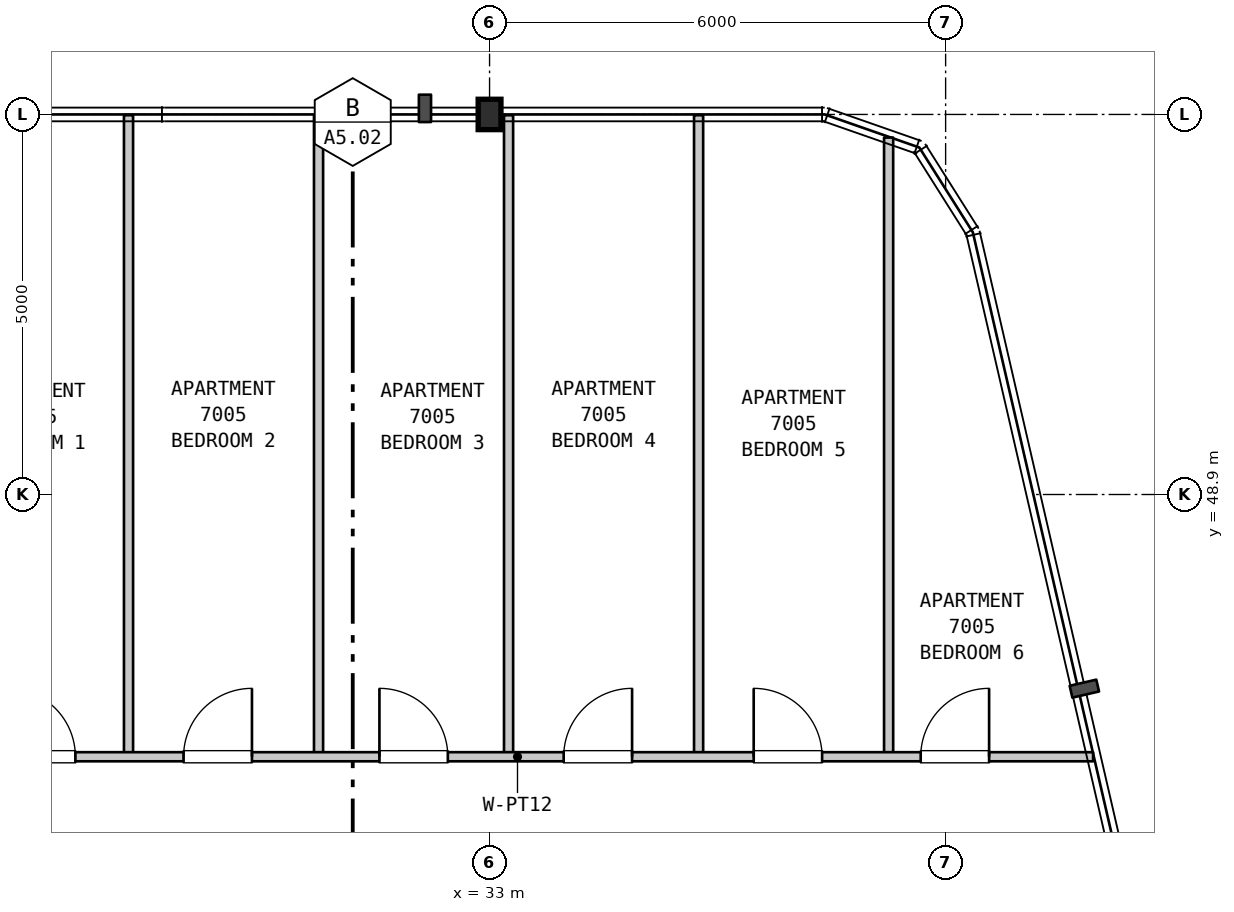
"""IFC4 building model, lengths in metres.
Left out: names, types, materials, properties, quantities, classifications, styles, units other than length and angle.
Written with IfcOpenShell. Run it as: python <this file> out.ifc"""

import sys

from ifc_helpers import new_model, si_unit, direction, frame, frame_2d, origin, origin_2d, place, context, subcontext, project, spatial, rectangle, i_section, extrude, element, fill, save


model = new_model("IFC4")
c1 = context("Model", 3, precision=1e-05, world=origin(), true_north=direction((0.0, 1.0)))
c2 = subcontext(c1, "Body", "Model", "MODEL_VIEW")
j1 = project(units=[si_unit("LENGTHUNIT", "METRE"), si_unit("PLANEANGLEUNIT", "RADIAN")], contexts=[c1])
p1 = place(None, origin())
s1 = spatial("IfcSite", under=j1, at=p1, CompositionType="ELEMENT")
p2 = place(p1, origin())
s2 = spatial("IfcBuilding", under=s1, at=p2, CompositionType="ELEMENT")
p3 = place(p2, frame((0.0, 0.0, 280.6)))
s3 = spatial("IfcBuildingStorey", under=s2, at=p3, CompositionType="ELEMENT", Elevation=280.6)
p4 = place(p3, frame((33.0, 53.9, 0.0), z_axis=(0.0, 0.0, 1.0), x_axis=(1.0, 0.0, 0.0)))
e1 = element("IfcColumn", 1, at=p4, inside=s3, PredefinedType="COLUMN", context=c2, shape_type="SweptSolid", body=[
    extrude(i_section(OverallWidth=0.3, OverallDepth=0.4, WebThickness=0.013, FlangeThickness=0.024, FilletRadius=0.027, at=origin_2d()), origin(), (0.0, 0.0, 1.0), 3.7),
])
for number, where, z_axis, x_axis in (
    (2, (28.25, 45.45, 0.0), (0.0, 0.0, 1.0), (0.0, 1.0, 0.0)),
    (3, (30.75, 45.45, 0.0), (0.0, 0.0, 1.0), (0.0, 1.0, 0.0)),
    (4, (33.25, 45.45, 0.0), (0.0, 0.0, 1.0), (0.0, 1.0, 0.0)),
    (5, (35.75, 45.45, 0.0), (0.0, 0.0, 1.0), (0.0, 1.0, 0.0)),
):
    element("IfcWall", number, at=place(p3, frame(where, z_axis=z_axis, x_axis=x_axis)), inside=s3, PredefinedType="PARTITIONING", context=c2, shape_type="SweptSolid", body=[
        extrude(rectangle(XDim=8.44, YDim=0.12, at=frame_2d((4.22, 0.0))), origin(), (0.0, 0.0, 1.0), 3.39),
    ])
p5 = place(p3, frame((38.25, 45.45, 0.0), z_axis=(0.0, 0.0, 1.0), x_axis=(0.0, 1.0, 0.0)))
e6 = element("IfcWall", 6, at=p5, inside=s3, PredefinedType="PARTITIONING", context=c2, shape_type="SweptSolid", body=[
    extrude(rectangle(XDim=8.146, YDim=0.12, at=frame_2d((4.073, 0.0))), origin(), (0.0, 0.0, 1.0), 3.39),
])
p6 = place(p3, frame((25.795, 45.45, 0.0), z_axis=(0.0, 0.0, 1.0), x_axis=(1.0, 0.0, 0.0)))
e7 = element("IfcWall", 7, at=p6, inside=s3, PredefinedType="PARTITIONING", context=c2, shape_type="SweptSolid", body=[
    extrude(rectangle(XDim=15.145, YDim=0.12, at=frame_2d((7.573, 0.0))), origin(), (0.0, 0.0, 1.0), 3.39),
])
p7 = place(p6, frame((0.856, 0.0, 0.0)))
e8 = element("IfcOpeningElement", 8, at=p7, cuts=e7, PredefinedType="OPENING", context=c2, shape_type="SweptSolid", body=[
    extrude(rectangle(XDim=0.9, YDim=2.15, at=frame_2d((0.45, 1.075))), frame((0.0, 0.07, 0.0), z_axis=(0.0, -1.0, 0.0), x_axis=(1.0, 0.0, 0.0)), (0.0, 0.0, 1.0), 0.14),
])
p8 = place(p6, frame((3.179, 0.0, 0.0)))
e9 = element("IfcOpeningElement", 9, at=p8, cuts=e7, PredefinedType="OPENING", context=c2, shape_type="SweptSolid", body=[
    extrude(rectangle(XDim=0.9, YDim=2.15, at=frame_2d((0.45, 1.075))), frame((0.0, 0.07, 0.0), z_axis=(0.0, -1.0, 0.0), x_axis=(1.0, 0.0, 0.0)), (0.0, 0.0, 1.0), 0.14),
])
p9 = place(p6, frame((5.756, 0.0, 0.0)))
e10 = element("IfcOpeningElement", 10, at=p9, cuts=e7, PredefinedType="OPENING", context=c2, shape_type="SweptSolid", body=[
    extrude(rectangle(XDim=0.9, YDim=2.15, at=frame_2d((0.45, 1.075))), frame((0.0, 0.07, 0.0), z_axis=(0.0, -1.0, 0.0), x_axis=(1.0, 0.0, 0.0)), (0.0, 0.0, 1.0), 0.14),
])
p10 = place(p6, frame((8.18, 0.0, 0.0)))
e11 = element("IfcOpeningElement", 11, at=p10, cuts=e7, PredefinedType="OPENING", context=c2, shape_type="SweptSolid", body=[
    extrude(rectangle(XDim=0.9, YDim=2.15, at=frame_2d((0.45, 1.075))), frame((0.0, 0.07, 0.0), z_axis=(0.0, -1.0, 0.0), x_axis=(1.0, 0.0, 0.0)), (0.0, 0.0, 1.0), 0.14),
])
p11 = place(p6, frame((10.68, 0.0, 0.0)))
e12 = element("IfcOpeningElement", 12, at=p11, cuts=e7, PredefinedType="OPENING", context=c2, shape_type="SweptSolid", body=[
    extrude(rectangle(XDim=0.9, YDim=2.15, at=frame_2d((0.45, 1.075))), frame((0.0, 0.07, 0.0), z_axis=(0.0, -1.0, 0.0), x_axis=(1.0, 0.0, 0.0)), (0.0, 0.0, 1.0), 0.14),
])
p12 = place(p6, frame((12.877, 0.0, 0.0)))
e13 = element("IfcOpeningElement", 13, at=p12, cuts=e7, PredefinedType="OPENING", context=c2, shape_type="SweptSolid", body=[
    extrude(rectangle(XDim=0.9, YDim=2.15, at=frame_2d((0.45, 1.075))), frame((0.0, 0.07, 0.0), z_axis=(0.0, -1.0, 0.0), x_axis=(1.0, 0.0, 0.0)), (0.0, 0.0, 1.0), 0.14),
])
p13 = place(p7, origin())
e14 = element("IfcDoor", 14, at=p13, inside=s3, OperationType="SINGLE_SWING_LEFT", PredefinedType="DOOR", context=c2, shape_type="SweptSolid", body=[
    extrude(rectangle(XDim=0.9, YDim=2.15, at=frame_2d((0.45, 1.075))), frame((0.0, 0.025, 0.0), z_axis=(0.0, -1.0, 0.0), x_axis=(1.0, 0.0, 0.0)), (0.0, 0.0, 1.0), 0.05),
])
fill(e8, e14)
p14 = place(p8, origin())
e15 = element("IfcDoor", 15, at=p14, inside=s3, OperationType="SINGLE_SWING_RIGHT", PredefinedType="DOOR", context=c2, shape_type="SweptSolid", body=[
    extrude(rectangle(XDim=0.9, YDim=2.15, at=frame_2d((0.45, 1.075))), frame((0.0, 0.025, 0.0), z_axis=(0.0, -1.0, 0.0), x_axis=(1.0, 0.0, 0.0)), (0.0, 0.0, 1.0), 0.05),
])
fill(e9, e15)
p15 = place(p9, origin())
e16 = element("IfcDoor", 16, at=p15, inside=s3, OperationType="SINGLE_SWING_LEFT", PredefinedType="DOOR", context=c2, shape_type="SweptSolid", body=[
    extrude(rectangle(XDim=0.9, YDim=2.15, at=frame_2d((0.45, 1.075))), frame((0.0, 0.025, 0.0), z_axis=(0.0, -1.0, 0.0), x_axis=(1.0, 0.0, 0.0)), (0.0, 0.0, 1.0), 0.05),
])
fill(e10, e16)
p16 = place(p10, origin())
e17 = element("IfcDoor", 17, at=p16, inside=s3, OperationType="SINGLE_SWING_RIGHT", PredefinedType="DOOR", context=c2, shape_type="SweptSolid", body=[
    extrude(rectangle(XDim=0.9, YDim=2.15, at=frame_2d((0.45, 1.075))), frame((0.0, 0.025, 0.0), z_axis=(0.0, -1.0, 0.0), x_axis=(1.0, 0.0, 0.0)), (0.0, 0.0, 1.0), 0.05),
])
fill(e11, e17)
p17 = place(p11, origin())
e18 = element("IfcDoor", 18, at=p17, inside=s3, OperationType="SINGLE_SWING_LEFT", PredefinedType="DOOR", context=c2, shape_type="SweptSolid", body=[
    extrude(rectangle(XDim=0.9, YDim=2.15, at=frame_2d((0.45, 1.075))), frame((0.0, 0.025, 0.0), z_axis=(0.0, -1.0, 0.0), x_axis=(1.0, 0.0, 0.0)), (0.0, 0.0, 1.0), 0.05),
])
fill(e12, e18)
p18 = place(p12, origin())
e19 = element("IfcDoor", 19, at=p18, inside=s3, OperationType="SINGLE_SWING_RIGHT", PredefinedType="DOOR", context=c2, shape_type="SweptSolid", body=[
    extrude(rectangle(XDim=0.9, YDim=2.15, at=frame_2d((0.45, 1.075))), frame((0.0, 0.025, 0.0), z_axis=(0.0, -1.0, 0.0), x_axis=(1.0, 0.0, 0.0)), (0.0, 0.0, 1.0), 0.05),
])
fill(e13, e19)
save(model, sys.argv[1])
